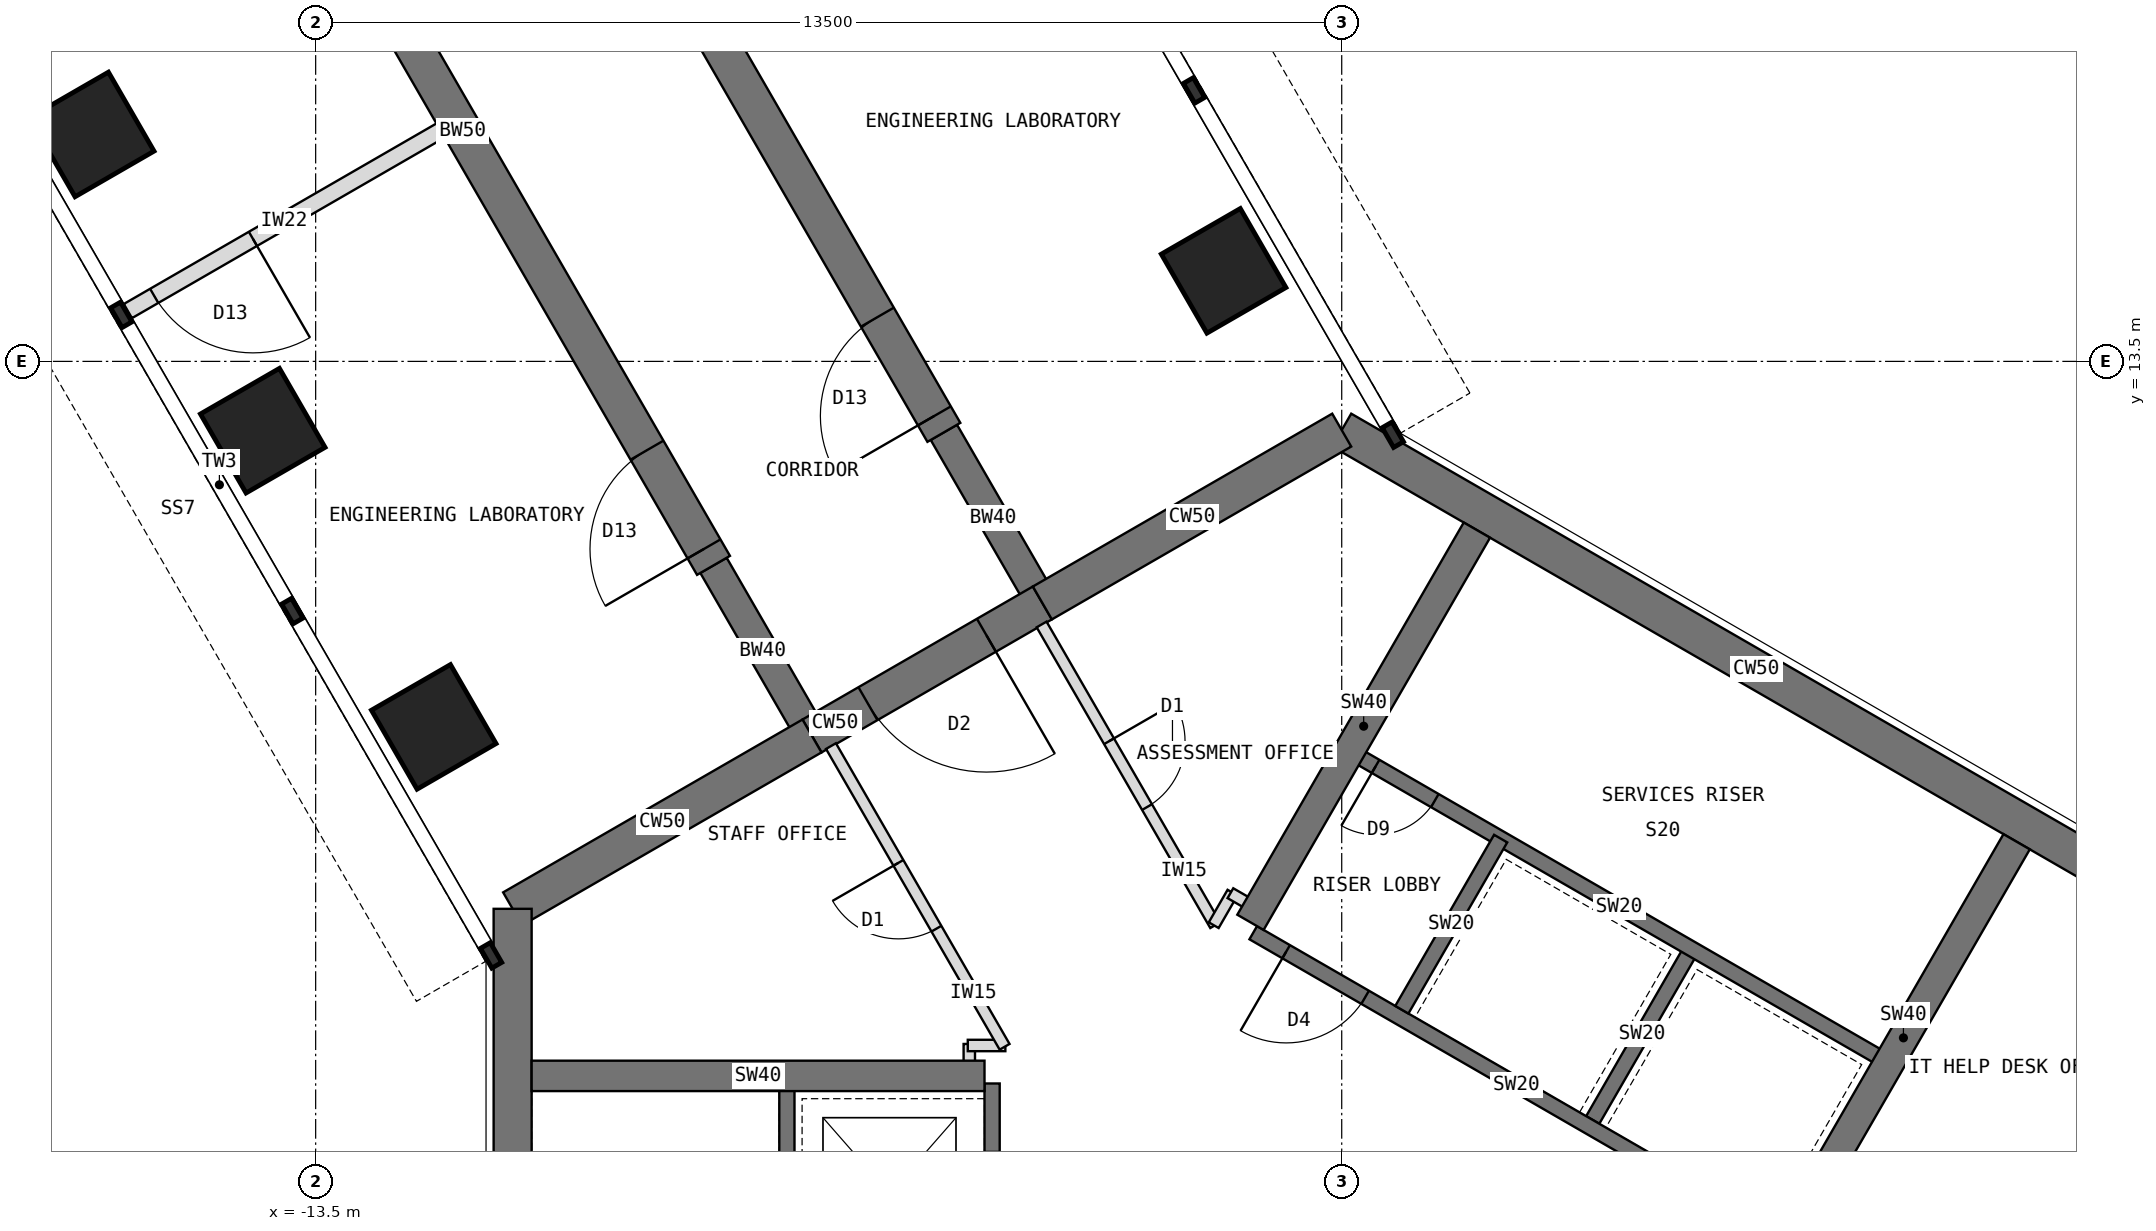
"""IFC4 building model, lengths in metres.
Left out: names, types, materials, properties, quantities, classifications, styles, units other than length and angle.
Written with IfcOpenShell. Run it as: python <this file> out.ifc"""

import sys

from ifc_helpers import new_model, si_unit, direction, frame, frame_2d, origin, origin_2d, place, context, subcontext, project, spatial, rectangle, extrude, element, fill, save


model = new_model("IFC4")
c1 = context("Model", 3, precision=1e-05, world=origin(), true_north=direction((0.0, 1.0)))
c2 = subcontext(c1, "Body", "Model", "MODEL_VIEW")
j1 = project(units=[si_unit("LENGTHUNIT", "METRE"), si_unit("PLANEANGLEUNIT", "RADIAN")], contexts=[c1])
p1 = place(None, origin())
s1 = spatial("IfcSite", under=j1, at=p1, CompositionType="ELEMENT")
p2 = place(p1, origin())
s2 = spatial("IfcBuilding", under=s1, at=p2, CompositionType="ELEMENT")
p3 = place(p2, frame((0.0, 0.0, 174.5)))
s3 = spatial("IfcBuildingStorey", under=s2, at=p3, CompositionType="ELEMENT", Elevation=174.5)
p4 = place(p3, frame((10.908, 6.298, 0.0), z_axis=(0.0, 0.0, 1.0), x_axis=(-0.866021940709, 0.500005998175, 0.0)))
e1 = element("IfcWall", 1, at=p4, inside=s3, PredefinedType="SHEAR", context=c2, shape_type="SweptSolid", body=[
    extrude(rectangle(XDim=12.596, YDim=0.5, at=frame_2d((6.298, 0.0))), origin(), (0.0, 0.0, 1.0), 4.0),
])
p5 = place(p3, frame((0.0, 12.596, 0.0), z_axis=(0.0, 0.0, 1.0), x_axis=(-0.866011268655, -0.500024481964, 0.0)))
e2 = element("IfcWall", 2, at=p5, inside=s3, PredefinedType="SHEAR", context=c2, shape_type="SweptSolid", body=[
    extrude(rectangle(XDim=4.548, YDim=0.5, at=frame_2d((2.274, 0.0))), origin(), (0.0, 0.0, 1.0), 4.0),
])
p6 = place(p3, frame((-3.939, 10.322, 0.0), z_axis=(0.0, 0.0, 1.0), x_axis=(-0.866019471182, -0.500010275428, 0.0)))
e3 = element("IfcWall", 3, at=p6, inside=s3, PredefinedType="SHEAR", context=c2, shape_type="SweptSolid", body=[
    extrude(rectangle(XDim=3.5, YDim=0.5, at=frame_2d((1.75, 0.0))), origin(), (0.0, 0.0, 1.0), 4.0),
])
p7 = place(p6, frame((0.85, 0.0, 0.0)))
e4 = element("IfcOpeningElement", 4, at=p7, cuts=e3, PredefinedType="OPENING", context=c2, shape_type="SweptSolid", body=[
    extrude(rectangle(XDim=1.8, YDim=2.1, at=frame_2d((0.9, 1.05))), frame((0.0, 0.26, 0.0), z_axis=(0.0, -1.0, 0.0), x_axis=(1.0, 0.0, 0.0)), (0.0, 0.0, 1.0), 0.52),
])
p8 = place(p3, frame((-6.97, 8.572, 0.0), z_axis=(0.0, 0.0, 1.0), x_axis=(-0.866034513004, -0.499984222037, 0.0)))
e5 = element("IfcWall", 5, at=p8, inside=s3, PredefinedType="SHEAR", context=c2, shape_type="SweptSolid", body=[
    extrude(rectangle(XDim=4.548, YDim=0.5, at=frame_2d((2.274, 0.0))), origin(), (0.0, 0.0, 1.0), 4.0),
])
p9 = place(p3, frame((-10.908, 6.298, 0.0), z_axis=(0.0, 0.0, 1.0), x_axis=(0.0, -1.0, 0.0)))
e6 = element("IfcWall", 6, at=p9, inside=s3, PredefinedType="SHEAR", context=c2, shape_type="SweptSolid", body=[
    extrude(rectangle(XDim=12.596, YDim=0.5, at=frame_2d((6.298, 0.0))), origin(), (0.0, 0.0, 1.0), 4.0),
])
p10 = place(p3, frame((-6.97, 8.572, 0.0), z_axis=(0.0, 0.0, 1.0), x_axis=(-0.499988811324, 0.866031863473, 0.0)))
e7 = element("IfcWall", 7, at=p10, inside=s3, PredefinedType="SHEAR", context=c2, shape_type="SweptSolid", body=[
    extrude(rectangle(XDim=2.592, YDim=0.4, at=frame_2d((1.296, 0.0))), origin(), (0.0, 0.0, 1.0), 4.0),
])
p11 = place(p3, frame((-8.266, 10.816, 0.0), z_axis=(0.0, 0.0, 1.0), x_axis=(-0.499996231654, 0.866027579429, 0.0)))
e8 = element("IfcWall", 8, at=p11, inside=s3, PredefinedType="SHEAR", context=c2, shape_type="SweptSolid", body=[
    extrude(rectangle(XDim=13.2, YDim=0.5, at=frame_2d((6.6, 0.0))), origin(), (0.0, 0.0, 1.0), 4.0),
])
p12 = place(p11, frame((0.25, 0.0, 0.0)))
e9 = element("IfcOpeningElement", 9, at=p12, cuts=e8, PredefinedType="OPENING", context=c2, shape_type="SweptSolid", body=[
    extrude(rectangle(XDim=1.5, YDim=2.1, at=frame_2d((0.75, 1.05))), frame((0.0, 0.26, 0.0), z_axis=(0.0, -1.0, 0.0), x_axis=(1.0, 0.0, 0.0)), (0.0, 0.0, 1.0), 0.52),
])
p13 = place(p3, frame((-3.939, 10.322, 0.0), z_axis=(0.0, 0.0, 1.0), x_axis=(-0.499918158782, 0.866072649678, 0.0)))
e10 = element("IfcWall", 10, at=p13, inside=s3, PredefinedType="SHEAR", context=c2, shape_type="SweptSolid", body=[
    extrude(rectangle(XDim=2.592, YDim=0.4, at=frame_2d((1.296, 0.0))), origin(), (0.0, 0.0, 1.0), 4.0),
])
p14 = place(p3, frame((-5.234, 12.566, 0.0), z_axis=(0.0, 0.0, 1.0), x_axis=(-0.500010103361, 0.866019570528, 0.0)))
e11 = element("IfcWall", 11, at=p14, inside=s3, PredefinedType="SHEAR", context=c2, shape_type="SweptSolid", body=[
    extrude(rectangle(XDim=13.2, YDim=0.5, at=frame_2d((6.6, 0.0))), origin(), (0.0, 0.0, 1.0), 4.0),
])
p15 = place(p14, frame((0.25, 0.0, 0.0)))
e12 = element("IfcOpeningElement", 12, at=p15, cuts=e11, PredefinedType="OPENING", context=c2, shape_type="SweptSolid", body=[
    extrude(rectangle(XDim=1.5, YDim=2.1, at=frame_2d((0.75, 1.05))), frame((0.0, 0.26, 0.0), z_axis=(0.0, -1.0, 0.0), x_axis=(1.0, 0.0, 0.0)), (0.0, 0.0, 1.0), 0.52),
])
for number, where, z_axis, x_axis in (
    (13, (-11.946, 8.691, 0.0), (0.0, 0.0, 1.0), (0.866, 0.5, 0.0)),
    (14, (-1.554, 14.691, 0.0), (0.0, 0.0, 1.0), (0.866, 0.5, 0.0)),
    (15, (-14.196, 12.588, 0.0), (0.0, 0.0, 1.0), (0.866, 0.5, 0.0)),
    (16, (-16.446, 16.486, 0.0), (0.0, 0.0, 1.0), (0.866, 0.5, 0.0)),
):
    element("IfcColumn", number, at=place(p3, frame(where, z_axis=z_axis, x_axis=x_axis)), inside=s3, PredefinedType="COLUMN", context=c2, shape_type="SweptSolid", body=[
        extrude(rectangle(XDim=1.2, YDim=1.2, at=origin_2d()), origin(), (0.0, 0.0, 1.0), 4.0),
    ])
p16 = place(p3, frame((5.764, 1.984, 0.0), z_axis=(0.0, 0.0, 1.0), x_axis=(-0.866026010844, 0.49999894854, 0.0)))
e17 = element("IfcWall", 17, at=p16, inside=s3, PredefinedType="SHEAR", context=c2, shape_type="SweptSolid", body=[
    extrude(rectangle(XDim=8.0, YDim=0.2, at=frame_2d((4.0, 0.0))), origin(), (0.0, 0.0, 1.0), 4.0),
])
p17 = place(p16, frame((6.3, 0.0, 0.0)))
e18 = element("IfcOpeningElement", 18, at=p17, cuts=e17, PredefinedType="OPENING", context=c2, shape_type="SweptSolid", body=[
    extrude(rectangle(XDim=1.2, YDim=2.1, at=frame_2d((0.6, 1.05))), frame((0.0, 0.11, 0.0), z_axis=(0.0, -1.0, 0.0), x_axis=(1.0, 0.0, 0.0)), (0.0, 0.0, 1.0), 0.22),
])
for number, where, z_axis, x_axis in (
    (19, (3.303, 3.52, 0.0), (0.0, 0.0, 1.0), (0.5, 0.866, 0.0)),
    (20, (0.791, 4.97, 0.0), (0.0, 0.0, 1.0), (0.5, 0.866, 0.0)),
):
    element("IfcWall", number, at=place(p3, frame(where, z_axis=z_axis, x_axis=x_axis)), inside=s3, PredefinedType="SHEAR", context=c2, shape_type="SweptSolid", body=[
        extrude(rectangle(XDim=2.6, YDim=0.2, at=frame_2d((1.3, 0.0))), origin(), (0.0, 0.0, 1.0), 4.0),
    ])
p18 = place(p3, frame((7.114, 4.322, 0.0), z_axis=(0.0, 0.0, 1.0), x_axis=(-0.866026010844, 0.49999894854, 0.0)))
e21 = element("IfcWall", 21, at=p18, inside=s3, PredefinedType="SHEAR", context=c2, shape_type="SweptSolid", body=[
    extrude(rectangle(XDim=8.0, YDim=0.2, at=frame_2d((4.0, 0.0))), origin(), (0.0, 0.0, 1.0), 4.0),
])
p19 = place(p18, frame((6.8, 0.0, 0.0)))
e22 = element("IfcOpeningElement", 22, at=p19, cuts=e21, PredefinedType="OPENING", context=c2, shape_type="SweptSolid", body=[
    extrude(rectangle(XDim=0.9, YDim=2.1, at=frame_2d((0.45, 1.05))), frame((0.0, 0.11, 0.0), z_axis=(0.0, -1.0, 0.0), x_axis=(1.0, 0.0, 0.0)), (0.0, 0.0, 1.0), 0.22),
])
p20 = place(p3, frame((-1.201, 6.12, 0.0), z_axis=(0.0, 0.0, 1.0), x_axis=(0.500021575205, 0.866012946976, 0.0)))
e23 = element("IfcWall", 23, at=p20, inside=s3, PredefinedType="SHEAR", context=c2, shape_type="SweptSolid", body=[
    extrude(rectangle(XDim=5.958, YDim=0.4, at=frame_2d((2.979, 0.0))), origin(), (0.0, 0.0, 1.0), 4.0),
])
p21 = place(p3, frame((5.901, 2.02, 0.0), z_axis=(0.0, 0.0, 1.0), x_axis=(0.500003832394, 0.86602319114, 0.0)))
e24 = element("IfcWall", 24, at=p21, inside=s3, PredefinedType="SHEAR", context=c2, shape_type="SweptSolid", body=[
    extrude(rectangle(XDim=5.958, YDim=0.4, at=frame_2d((2.979, 0.0))), origin(), (0.0, 0.0, 1.0), 4.0),
])
p22 = place(p3, frame((-4.6, 4.0, 0.0), z_axis=(0.0, 0.0, 1.0), x_axis=(0.0, -1.0, 0.0)))
e25 = element("IfcWall", 25, at=p22, inside=s3, PredefinedType="SHEAR", context=c2, shape_type="SweptSolid", body=[
    extrude(rectangle(XDim=8.0, YDim=0.2, at=frame_2d((4.0, 0.0))), origin(), (0.0, 0.0, 1.0), 4.0),
])
p23 = place(p22, frame((6.3, 0.0, 0.0)))
e26 = element("IfcOpeningElement", 26, at=p23, cuts=e25, PredefinedType="OPENING", context=c2, shape_type="SweptSolid", body=[
    extrude(rectangle(XDim=1.2, YDim=2.1, at=frame_2d((0.6, 1.05))), frame((0.0, 0.11, 0.0), z_axis=(0.0, -1.0, 0.0), x_axis=(1.0, 0.0, 0.0)), (0.0, 0.0, 1.0), 0.22),
])
p24 = place(p22, frame((0.9, 0.0, 0.0)))
e27 = element("IfcOpeningElement", 27, at=p24, cuts=e25, PredefinedType="OPENING", context=c2, shape_type="SweptSolid", body=[
    extrude(rectangle(XDim=1.1, YDim=2.2, at=frame_2d((0.55, 1.1))), frame((0.0, 0.11, 0.0), z_axis=(0.0, -1.0, 0.0), x_axis=(1.0, 0.0, 0.0)), (0.0, 0.0, 1.0), 0.22),
])
p25 = place(p3, frame((-7.3, 4.0, 0.0), z_axis=(0.0, 0.0, 1.0), x_axis=(0.0, -1.0, 0.0)))
e28 = element("IfcWall", 28, at=p25, inside=s3, PredefinedType="SHEAR", context=c2, shape_type="SweptSolid", body=[
    extrude(rectangle(XDim=8.0, YDim=0.2, at=frame_2d((4.0, 0.0))), origin(), (0.0, 0.0, 1.0), 4.0),
])
p26 = place(p25, frame((6.7, 0.0, 0.0)))
e29 = element("IfcOpeningElement", 29, at=p26, cuts=e28, PredefinedType="OPENING", context=c2, shape_type="SweptSolid", body=[
    extrude(rectangle(XDim=1.1, YDim=2.1, at=frame_2d((0.55, 1.05))), frame((0.0, 0.11, 0.0), z_axis=(0.0, -1.0, 0.0), x_axis=(1.0, 0.0, 0.0)), (0.0, 0.0, 1.0), 0.22),
])
p27 = place(p3, frame((-4.7, 4.1, 0.0), z_axis=(0.0, 0.0, 1.0), x_axis=(-1.0, 0.0, 0.0)))
e30 = element("IfcWall", 30, at=p27, inside=s3, PredefinedType="SHEAR", context=c2, shape_type="SweptSolid", body=[
    extrude(rectangle(XDim=5.958, YDim=0.4, at=frame_2d((2.979, 0.0))), origin(), (0.0, 0.0, 1.0), 4.0),
])
p28 = place(p3, frame((-11.857, 16.537, 0.0), z_axis=(0.0, 0.0, 1.0), x_axis=(-0.866033238375, -0.499986429846, 0.0)))
e31 = element("IfcWall", 31, at=p28, inside=s3, PredefinedType="PARTITIONING", context=c2, shape_type="SweptSolid", body=[
    extrude(rectangle(XDim=4.75, YDim=0.215, at=frame_2d((2.375, 0.0))), origin(), (0.0, 0.0, 1.0), 3.8),
])
p29 = place(p28, frame((2.85, 0.0, 0.0)))
e32 = element("IfcOpeningElement", 32, at=p29, cuts=e31, PredefinedType="OPENING", context=c2, shape_type="SweptSolid", body=[
    extrude(rectangle(XDim=1.5, YDim=2.1, at=frame_2d((0.75, 1.05))), frame((0.0, 0.117, 0.0), z_axis=(0.0, -1.0, 0.0), x_axis=(1.0, 0.0, 0.0)), (0.0, 0.0, 1.0), 0.235),
])
p30 = place(p3, frame((-4.9, 4.09, 0.0), z_axis=(0.0, 0.0, 1.0), x_axis=(0.0, 1.0, 0.0)))
e33 = element("IfcWall", 33, at=p30, inside=s3, PredefinedType="PARTITIONING", context=c2, shape_type="SweptSolid", body=[
    extrude(rectangle(XDim=0.43, YDim=0.15, at=frame_2d((0.215, 0.0))), origin(), (0.0, 0.0, 1.0), 3.8),
])
p31 = place(p3, frame((-4.92, 4.5, 0.0), z_axis=(0.0, 0.0, 1.0), x_axis=(1.0, 0.0, 0.0)))
e34 = element("IfcWall", 34, at=p31, inside=s3, PredefinedType="PARTITIONING", context=c2, shape_type="SweptSolid", body=[
    extrude(rectangle(XDim=0.494, YDim=0.15, at=frame_2d((0.247, 0.0))), origin(), (0.0, 0.0, 1.0), 3.8),
])
p32 = place(p3, frame((-4.436, 4.483, 0.0), z_axis=(0.0, 0.0, 1.0), x_axis=(-0.500001558674, 0.866024503882, 0.0)))
e35 = element("IfcWall", 35, at=p32, inside=s3, PredefinedType="PARTITIONING", context=c2, shape_type="SweptSolid", body=[
    extrude(rectangle(XDim=4.568, YDim=0.15, at=frame_2d((2.284, 0.0))), origin(), (0.0, 0.0, 1.0), 3.8),
])
p33 = place(p32, frame((1.794, 0.0, 0.0)))
e36 = element("IfcOpeningElement", 36, at=p33, cuts=e35, PredefinedType="OPENING", context=c2, shape_type="SweptSolid", body=[
    extrude(rectangle(XDim=1.0, YDim=2.1, at=frame_2d((0.5, 1.05))), frame((0.0, 0.085, 0.0), z_axis=(0.0, -1.0, 0.0), x_axis=(1.0, 0.0, 0.0)), (0.0, 0.0, 1.0), 0.17),
])
p34 = place(p3, frame((-3.948, 10.039, 0.0), z_axis=(0.0, 0.0, 1.0), x_axis=(0.500001558674, -0.866024503882, 0.0)))
e37 = element("IfcWall", 37, at=p34, inside=s3, PredefinedType="PARTITIONING", context=c2, shape_type="SweptSolid", body=[
    extrude(rectangle(XDim=4.568, YDim=0.15, at=frame_2d((2.284, 0.0))), origin(), (0.0, 0.0, 1.0), 3.8),
])
p35 = place(p34, frame((1.774, 0.0, 0.0)))
e38 = element("IfcOpeningElement", 38, at=p35, cuts=e37, PredefinedType="OPENING", context=c2, shape_type="SweptSolid", body=[
    extrude(rectangle(XDim=1.0, YDim=2.1, at=frame_2d((0.5, 1.05))), frame((0.0, 0.085, 0.0), z_axis=(0.0, -1.0, 0.0), x_axis=(1.0, 0.0, 0.0)), (0.0, 0.0, 1.0), 0.17),
])
p36 = place(p3, frame((-1.684, 6.083, 0.0), z_axis=(0.0, 0.0, 1.0), x_axis=(0.50033519877, 0.865831790172, 0.0)))
e39 = element("IfcWall", 39, at=p36, inside=s3, PredefinedType="PARTITIONING", context=c2, shape_type="SweptSolid", body=[
    extrude(rectangle(XDim=0.494, YDim=0.15, at=frame_2d((0.247, 0.0))), origin(), (0.0, 0.0, 1.0), 3.8),
])
p37 = place(p3, frame((-1.464, 6.503, 0.0), z_axis=(0.0, 0.0, 1.0), x_axis=(0.866138304741, -0.499804398801, 0.0)))
e40 = element("IfcWall", 40, at=p37, inside=s3, PredefinedType="PARTITIONING", context=c2, shape_type="SweptSolid", body=[
    extrude(rectangle(XDim=0.43, YDim=0.15, at=frame_2d((0.215, 0.0))), origin(), (0.0, 0.0, 1.0), 3.8),
])
p38 = place(p17, origin())
e41 = element("IfcDoor", 41, at=p38, inside=s3, OperationType="SINGLE_SWING_RIGHT", PredefinedType="DOOR", context=c2, shape_type="SweptSolid", body=[
    extrude(rectangle(XDim=1.2, YDim=2.1, at=frame_2d((0.6, 1.05))), frame((0.0, 0.025, 0.0), z_axis=(0.0, -1.0, 0.0), x_axis=(1.0, 0.0, 0.0)), (0.0, 0.0, 1.0), 0.05),
])
fill(e18, e41)
p39 = place(p19, origin())
e42 = element("IfcDoor", 42, at=p39, inside=s3, OperationType="SINGLE_SWING_RIGHT", PredefinedType="DOOR", context=c2, shape_type="SweptSolid", body=[
    extrude(rectangle(XDim=0.9, YDim=2.1, at=frame_2d((0.45, 1.05))), frame((0.0, 0.025, 0.0), z_axis=(0.0, -1.0, 0.0), x_axis=(1.0, 0.0, 0.0)), (0.0, 0.0, 1.0), 0.05),
])
fill(e22, e42)
p40 = place(p7, origin())
e43 = element("IfcDoor", 43, at=p40, inside=s3, OperationType="DOUBLE_DOOR_DOUBLE_SWING", PredefinedType="DOOR", context=c2, shape_type="SweptSolid", body=[
    extrude(rectangle(XDim=1.8, YDim=2.1, at=frame_2d((0.9, 1.05))), frame((0.0, 0.025, 0.0), z_axis=(0.0, -1.0, 0.0), x_axis=(1.0, 0.0, 0.0)), (0.0, 0.0, 1.0), 0.05),
])
fill(e4, e43)
p41 = place(p29, origin())
e44 = element("IfcDoor", 44, at=p41, inside=s3, OperationType="DOUBLE_DOOR_SINGLE_SWING", PredefinedType="DOOR", context=c2, shape_type="SweptSolid", body=[
    extrude(rectangle(XDim=1.5, YDim=2.1, at=frame_2d((0.75, 1.05))), frame((0.0, 0.025, 0.0), z_axis=(0.0, -1.0, 0.0), x_axis=(1.0, 0.0, 0.0)), (0.0, 0.0, 1.0), 0.05),
])
fill(e32, e44)
p42 = place(p35, origin())
e45 = element("IfcDoor", 45, at=p42, inside=s3, OperationType="SINGLE_SWING_LEFT", PredefinedType="DOOR", context=c2, shape_type="SweptSolid", body=[
    extrude(rectangle(XDim=1.0, YDim=2.1, at=frame_2d((0.5, 1.05))), frame((0.0, 0.025, 0.0), z_axis=(0.0, -1.0, 0.0), x_axis=(1.0, 0.0, 0.0)), (0.0, 0.0, 1.0), 0.05),
])
fill(e38, e45)
p43 = place(p33, origin())
e46 = element("IfcDoor", 46, at=p43, inside=s3, OperationType="SINGLE_SWING_RIGHT", PredefinedType="DOOR", context=c2, shape_type="SweptSolid", body=[
    extrude(rectangle(XDim=1.0, YDim=2.1, at=frame_2d((0.5, 1.05))), frame((0.0, 0.025, 0.0), z_axis=(0.0, -1.0, 0.0), x_axis=(1.0, 0.0, 0.0)), (0.0, 0.0, 1.0), 0.05),
])
fill(e36, e46)
p44 = place(p12, origin())
e47 = element("IfcDoor", 47, at=p44, inside=s3, OperationType="DOUBLE_DOOR_SINGLE_SWING", PredefinedType="DOOR", context=c2, shape_type="SweptSolid", body=[
    extrude(rectangle(XDim=1.5, YDim=2.1, at=frame_2d((0.75, 1.05))), frame((0.0, 0.025, 0.0), z_axis=(0.0, -1.0, 0.0), x_axis=(1.0, 0.0, 0.0)), (0.0, 0.0, 1.0), 0.05),
])
fill(e9, e47)
p45 = place(p15, origin())
e48 = element("IfcDoor", 48, at=p45, inside=s3, OperationType="DOUBLE_DOOR_SINGLE_SWING", PredefinedType="DOOR", context=c2, shape_type="SweptSolid", body=[
    extrude(rectangle(XDim=1.5, YDim=2.1, at=frame_2d((0.75, 1.05))), frame((0.0, 0.025, 0.0), z_axis=(0.0, -1.0, 0.0), x_axis=(1.0, 0.0, 0.0)), (0.0, 0.0, 1.0), 0.05),
])
fill(e12, e48)
save(model, sys.argv[1])
